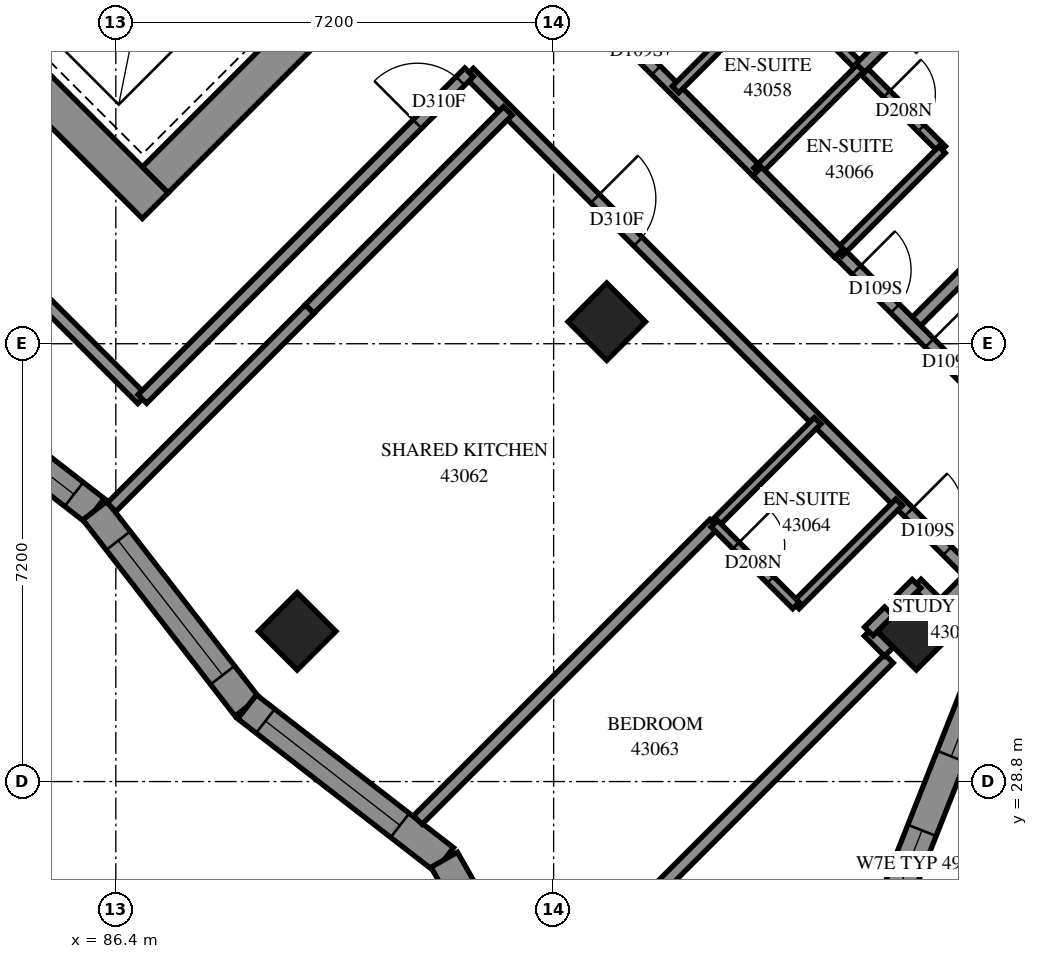
"""IFC4 building model, lengths in metres.
Left out: names, types, materials, properties, quantities, classifications, styles, units other than length and angle.
Written with IfcOpenShell. Run it as: python <this file> out.ifc"""

import sys

from ifc_helpers import new_model, si_unit, direction, frame, frame_2d, origin, origin_2d, place, context, subcontext, project, spatial, polyline, rectangle, outline, extrude, element, fill, save


model = new_model("IFC4")
c1 = context("Model", 3, precision=1e-05, world=origin(), true_north=direction((0.0, 1.0)))
c2 = subcontext(c1, "Body", "Model", "MODEL_VIEW")
j1 = project(units=[si_unit("LENGTHUNIT", "METRE"), si_unit("PLANEANGLEUNIT", "RADIAN")], contexts=[c1])
p1 = place(None, origin())
s1 = spatial("IfcSite", under=j1, at=p1, CompositionType="ELEMENT")
p2 = place(p1, origin())
s2 = spatial("IfcBuilding", under=s1, at=p2, CompositionType="ELEMENT")
p3 = place(p2, frame((0.0, 0.0, 159.2)))
s3 = spatial("IfcBuildingStorey", under=s2, at=p3, CompositionType="ELEMENT", Elevation=159.2)
for number, where, z_axis, x_axis in (
    (1, (94.474, 36.362, 0.0), (0.0, 0.0, 1.0), (0.707, -0.707, 0.0)),
    (2, (89.382, 31.271, 0.0), (0.0, 0.0, 1.0), (0.707, -0.707, 0.0)),
    (3, (99.565, 31.271, 0.0), (0.0, 0.0, 1.0), (0.707, -0.707, 0.0)),
):
    element("IfcColumn", number, at=place(p3, frame(where, z_axis=z_axis, x_axis=x_axis)), inside=s3, PredefinedType="COLUMN", context=c2, shape_type="SweptSolid", body=[
        extrude(rectangle(XDim=0.9, YDim=0.9, at=origin_2d()), origin(), (0.0, 0.0, 1.0), 3.1),
    ])
p4 = place(p3, frame((76.018, 49.302, -0.3), z_axis=(0.0, 0.0, 1.0), x_axis=(0.7071067812, -0.7071067812, 0.0)))
e4 = element("IfcWall", 4, at=p4, inside=s3, PredefinedType="SHEAR", context=c2, shape_type="SweptSolid", body=[
    extrude(rectangle(XDim=15.6, YDim=0.6, at=frame_2d((7.8, 0.0))), origin(), (0.0, 0.0, 1.0), 2.7),
])
p5 = place(p3, frame((87.049, 38.695, -0.3), z_axis=(0.0, 0.0, 1.0), x_axis=(0.7071067812, 0.7071067812, 0.0)))
e5 = element("IfcWall", 5, at=p5, inside=s3, PredefinedType="SHEAR", context=c2, shape_type="SweptSolid", body=[
    extrude(rectangle(XDim=14.4, YDim=0.6, at=frame_2d((7.2, 0.0))), origin(), (0.0, 0.0, 1.0), 2.7),
])
p6 = place(p5, frame((4.55, 0.0, 0.3)))
e6 = element("IfcOpeningElement", 6, at=p6, cuts=e5, PredefinedType="OPENING", context=c2, shape_type="SweptSolid", body=[
    extrude(rectangle(XDim=1.1, YDim=2.1, at=frame_2d((0.55, 1.05))), frame((0.0, 0.31, 0.0), z_axis=(0.0, -1.0, 0.0), x_axis=(1.0, 0.0, 0.0)), (0.0, 0.0, 1.0), 0.62),
])
p7 = place(p5, frame((11.35, 0.0, 0.3)))
e7 = element("IfcOpeningElement", 7, at=p7, cuts=e5, PredefinedType="OPENING", context=c2, shape_type="SweptSolid", body=[
    extrude(rectangle(XDim=1.1, YDim=2.1, at=frame_2d((0.55, 1.05))), frame((0.0, 0.31, 0.0), z_axis=(0.0, -1.0, 0.0), x_axis=(1.0, 0.0, 0.0)), (0.0, 0.0, 1.0), 0.62),
])
p8 = place(p3, frame((98.784, 25.787, 0.0), z_axis=(0.0, 0.0, 1.0), x_axis=(0.3677363656, 0.9299300863, 0.0)))
e8 = element("IfcWall", 8, at=p8, inside=s3, PredefinedType="SOLIDWALL", context=c2, shape_type="SweptSolid", body=[
    extrude(outline(polyline([(-0.113, -0.25), (5.421, -0.25), (5.638, 0.25), (0.113, 0.25), (-0.113, -0.25)])), origin(), (0.0, 0.0, 1.0), 3.1),
])
p9 = place(p8, frame((1.177, 0.0, 0.45)))
e9 = element("IfcOpeningElement", 9, at=p9, cuts=e8, PredefinedType="OPENING", context=c2, shape_type="SweptSolid", body=[
    extrude(rectangle(XDim=1.2, YDim=2.5, at=frame_2d((0.6, 1.25))), frame((0.0, 0.26, 0.0), z_axis=(0.0, -1.0, 0.0), x_axis=(1.0, 0.0, 0.0)), (0.0, 0.0, 1.0), 0.52),
])
p10 = place(p8, frame((3.685, 0.0, 0.45)))
e10 = element("IfcOpeningElement", 10, at=p10, cuts=e8, PredefinedType="OPENING", context=c2, shape_type="SweptSolid", body=[
    extrude(rectangle(XDim=1.2, YDim=2.5, at=frame_2d((0.6, 1.25))), frame((0.0, 0.26, 0.0), z_axis=(0.0, -1.0, 0.0), x_axis=(1.0, 0.0, 0.0)), (0.0, 0.0, 1.0), 0.52),
])
p11 = place(p3, frame((82.828, 35.76, 0.0), z_axis=(0.0, 0.0, 1.0), x_axis=(0.7901609986, -0.6128993362, 0.0)))
e11 = element("IfcWall", 11, at=p11, inside=s3, PredefinedType="SOLIDWALL", context=c2, shape_type="SweptSolid", body=[
    extrude(outline(polyline([(-0.032, -0.25), (4.053, -0.25), (4.116, 0.25), (0.032, 0.25), (-0.032, -0.25)])), origin(), (0.0, 0.0, 1.0), 3.1),
])
p12 = place(p11, frame((0.849, 0.0, 0.45)))
e12 = element("IfcOpeningElement", 12, at=p12, cuts=e11, PredefinedType="OPENING", context=c2, shape_type="SweptSolid", body=[
    extrude(rectangle(XDim=2.8, YDim=2.5, at=frame_2d((1.4, 1.25))), frame((0.0, 0.26, 0.0), z_axis=(0.0, -1.0, 0.0), x_axis=(1.0, 0.0, 0.0)), (0.0, 0.0, 1.0), 0.52),
])
p13 = place(p3, frame((86.056, 33.257, 0.0), z_axis=(0.0, 0.0, 1.0), x_axis=(0.6128993362, -0.7901609986, 0.0)))
e13 = element("IfcWall", 13, at=p13, inside=s3, PredefinedType="SOLIDWALL", context=c2, shape_type="SweptSolid", body=[
    extrude(outline(polyline([(0.032, -0.25), (4.116, -0.25), (4.053, 0.25), (-0.032, 0.25), (0.032, -0.25)])), origin(), (0.0, 0.0, 1.0), 3.1),
])
p14 = place(p13, frame((0.626, 0.0, 0.45)))
e14 = element("IfcOpeningElement", 14, at=p14, cuts=e13, PredefinedType="OPENING", context=c2, shape_type="SweptSolid", body=[
    extrude(rectangle(XDim=2.8, YDim=2.5, at=frame_2d((1.4, 1.25))), frame((0.0, 0.26, 0.0), z_axis=(0.0, -1.0, 0.0), x_axis=(1.0, 0.0, 0.0)), (0.0, 0.0, 1.0), 0.52),
])
p15 = place(p3, frame((88.559, 30.029, 0.0), z_axis=(0.0, 0.0, 1.0), x_axis=(0.7901665614, -0.6128921644, 0.0)))
e15 = element("IfcWall", 15, at=p15, inside=s3, PredefinedType="SOLIDWALL", context=c2, shape_type="SweptSolid", body=[
    extrude(outline(polyline([(-0.032, -0.25), (4.053, -0.25), (4.152, 0.25), (0.032, 0.25), (-0.032, -0.25)])), origin(), (0.0, 0.0, 1.0), 3.1),
])
p16 = place(p15, frame((0.381, 0.0, 0.45)))
e16 = element("IfcOpeningElement", 16, at=p16, cuts=e15, PredefinedType="OPENING", context=c2, shape_type="SweptSolid", body=[
    extrude(rectangle(XDim=2.8, YDim=2.5, at=frame_2d((1.4, 1.25))), frame((0.0, 0.26, 0.0), z_axis=(0.0, -1.0, 0.0), x_axis=(1.0, 0.0, 0.0)), (0.0, 0.0, 1.0), 0.52),
])
p17 = place(p3, frame((91.801, 27.515, 0.0), z_axis=(0.0, 0.0, 1.0), x_axis=(0.4947688164, -0.8690246362, 0.0)))
e17 = element("IfcWall", 17, at=p17, inside=s3, PredefinedType="SOLIDWALL", context=c2, shape_type="SweptSolid", body=[
    extrude(outline(polyline([(0.05, -0.25), (4.252, -0.25), (3.832, 0.25), (-0.05, 0.25), (0.05, -0.25)])), origin(), (0.0, 0.0, 1.0), 3.1),
])
p18 = place(p17, frame((0.769, 0.0, 0.45)))
e18 = element("IfcOpeningElement", 18, at=p18, cuts=e17, PredefinedType="OPENING", context=c2, shape_type="SweptSolid", body=[
    extrude(rectangle(XDim=1.2, YDim=2.5, at=frame_2d((0.6, 1.25))), frame((0.0, 0.26, 0.0), z_axis=(0.0, -1.0, 0.0), x_axis=(1.0, 0.0, 0.0)), (0.0, 0.0, 1.0), 0.52),
])
p19 = place(p3, frame((92.209, 40.459, 0.0), z_axis=(0.0, 0.0, 1.0), x_axis=(0.7071067812, -0.7071067812, 0.0)))
e19 = element("IfcWall", 19, at=p19, inside=s3, PredefinedType="PARTITIONING", context=c2, shape_type="SweptSolid", body=[
    extrude(rectangle(XDim=11.698, YDim=0.2, at=frame_2d((5.849, 0.0))), origin(), (0.0, 0.0, 1.0), 3.1),
])
p20 = place(p19, frame((2.931, 0.0, 0.0)))
e20 = element("IfcOpeningElement", 20, at=p20, cuts=e19, PredefinedType="OPENING", context=c2, shape_type="SweptSolid", body=[
    extrude(rectangle(XDim=1.0, YDim=2.1, at=frame_2d((0.5, 1.05))), frame((0.0, 0.11, 0.0), z_axis=(0.0, -1.0, 0.0), x_axis=(1.0, 0.0, 0.0)), (0.0, 0.0, 1.0), 0.22),
])
p21 = place(p19, frame((10.223, 0.0, 0.0)))
e21 = element("IfcOpeningElement", 21, at=p21, cuts=e19, PredefinedType="OPENING", context=c2, shape_type="SweptSolid", body=[
    extrude(rectangle(XDim=0.9, YDim=2.1, at=frame_2d((0.45, 1.05))), frame((0.0, 0.11, 0.0), z_axis=(0.0, -1.0, 0.0), x_axis=(1.0, 0.0, 0.0)), (0.0, 0.0, 1.0), 0.22),
])
p22 = place(p3, frame((80.423, 41.497, 0.0), z_axis=(0.0, 0.0, 1.0), x_axis=(0.7071067812, -0.7071067812, 0.0)))
e22 = element("IfcWall", 22, at=p22, inside=s3, PredefinedType="PARTITIONING", context=c2, shape_type="SweptSolid", body=[
    extrude(rectangle(XDim=9.065, YDim=0.2, at=frame_2d((4.532, 0.0))), origin(), (0.0, 0.0, 1.0), 3.1),
])
p23 = place(p3, frame((86.837, 35.091, 0.0), z_axis=(0.0, 0.0, 1.0), x_axis=(0.7071067812, 0.7071067812, 0.0)))
e23 = element("IfcWall", 23, at=p23, inside=s3, PredefinedType="PARTITIONING", context=c2, shape_type="SweptSolid", body=[
    extrude(rectangle(XDim=7.597, YDim=0.2, at=frame_2d((3.799, 0.0))), origin(), (0.0, 0.0, 1.0), 3.1),
])
p24 = place(p23, frame((6.395, 0.0, 0.0)))
e24 = element("IfcOpeningElement", 24, at=p24, cuts=e23, PredefinedType="OPENING", context=c2, shape_type="SweptSolid", body=[
    extrude(rectangle(XDim=1.0, YDim=2.1, at=frame_2d((0.5, 1.05))), frame((0.0, 0.11, 0.0), z_axis=(0.0, -1.0, 0.0), x_axis=(1.0, 0.0, 0.0)), (0.0, 0.0, 1.0), 0.22),
])
p25 = place(p3, frame((91.366, 28.168, 0.0), z_axis=(0.0, 0.0, 1.0), x_axis=(0.7072591319, 0.7069543977, 0.0)))
e25 = element("IfcWall", 25, at=p25, inside=s3, PredefinedType="PARTITIONING", context=c2, shape_type="SweptSolid", body=[
    extrude(rectangle(XDim=6.891, YDim=0.2, at=frame_2d((3.446, 0.0))), origin(), (0.0, 0.0, 1.0), 3.1),
])
p26 = place(p3, frame((99.494, 36.292, 0.0), z_axis=(0.0, 0.0, 1.0), x_axis=(0.7071067812, 0.7071067812, 0.0)))
e26 = element("IfcWall", 26, at=p26, inside=s3, PredefinedType="PARTITIONING", context=c2, shape_type="SweptSolid", body=[
    extrude(rectangle(XDim=6.799, YDim=0.2, at=frame_2d((3.4, 0.0))), origin(), (0.0, 0.0, 1.0), 3.1),
])
p27 = place(p3, frame((94.923, 26.631, 0.0), z_axis=(0.0, 0.0, 1.0), x_axis=(0.7071067812, 0.7071067812, 0.0)))
e27 = element("IfcWall", 27, at=p27, inside=s3, PredefinedType="PARTITIONING", context=c2, shape_type="SweptSolid", body=[
    extrude(rectangle(XDim=5.926, YDim=0.2, at=frame_2d((2.963, 0.0))), origin(), (0.0, 0.0, 1.0), 2.6),
])
p28 = place(p3, frame((98.295, 37.497, 0.0), z_axis=(0.0, 0.0, 1.0), x_axis=(0.7071067812, -0.7071067812, 0.0)))
e28 = element("IfcWall", 28, at=p28, inside=s3, PredefinedType="PARTITIONING", context=c2, shape_type="SweptSolid", body=[
    extrude(rectangle(XDim=5.301, YDim=0.2, at=frame_2d((2.65, 0.0))), origin(), (0.0, 0.0, 1.0), 3.1),
])
p29 = place(p28, frame((0.401, 0.0, 0.0)))
e29 = element("IfcOpeningElement", 29, at=p29, cuts=e28, PredefinedType="OPENING", context=c2, shape_type="SweptSolid", body=[
    extrude(rectangle(XDim=0.9, YDim=2.1, at=frame_2d((0.45, 1.05))), frame((0.0, 0.11, 0.0), z_axis=(0.0, -1.0, 0.0), x_axis=(1.0, 0.0, 0.0)), (0.0, 0.0, 1.0), 0.22),
])
p30 = place(p28, frame((2.1, 0.0, 0.0)))
e30 = element("IfcOpeningElement", 30, at=p30, cuts=e28, PredefinedType="OPENING", context=c2, shape_type="SweptSolid", body=[
    extrude(rectangle(XDim=0.9, YDim=2.1, at=frame_2d((0.45, 1.05))), frame((0.0, 0.11, 0.0), z_axis=(0.0, -1.0, 0.0), x_axis=(1.0, 0.0, 0.0)), (0.0, 0.0, 1.0), 0.22),
])
p31 = place(p3, frame((89.586, 36.57, 0.0), z_axis=(0.0, 0.0, 1.0), x_axis=(0.7073237184, 0.7068897774, 0.0)))
e31 = element("IfcWall", 31, at=p31, inside=s3, PredefinedType="PARTITIONING", context=c2, shape_type="SweptSolid", body=[
    extrude(rectangle(XDim=4.609, YDim=0.2, at=frame_2d((2.304, 0.0))), origin(), (0.0, 0.0, 1.0), 3.1),
])
p32 = place(p3, frame((86.33, 33.311, 0.0), z_axis=(0.0, 0.0, 1.0), x_axis=(0.7070959278, 0.7071176345, 0.0)))
e32 = element("IfcWall", 32, at=p32, inside=s3, PredefinedType="PARTITIONING", context=c2, shape_type="SweptSolid", body=[
    extrude(rectangle(XDim=4.607, YDim=0.2, at=frame_2d((2.304, 0.0))), origin(), (0.0, 0.0, 1.0), 3.1),
])
p33 = place(p3, frame((97.305, 41.881, 0.0), z_axis=(0.0, 0.0, 1.0), x_axis=(0.7067382634, -0.707475107, 0.0)))
e33 = element("IfcWall", 33, at=p33, inside=s3, PredefinedType="PARTITIONING", context=c2, shape_type="SweptSolid", body=[
    extrude(rectangle(XDim=3.8, YDim=0.15, at=frame_2d((1.9, 0.0))), origin(), (0.0, 0.0, 1.0), 3.1),
])
p34 = place(p33, frame((0.445, 0.0, 0.0)))
e34 = element("IfcOpeningElement", 34, at=p34, cuts=e33, PredefinedType="OPENING", context=c2, shape_type="SweptSolid", body=[
    extrude(rectangle(XDim=0.8, YDim=2.1, at=frame_2d((0.4, 1.05))), frame((0.0, 0.085, 0.0), z_axis=(0.0, -1.0, 0.0), x_axis=(1.0, 0.0, 0.0)), (0.0, 0.0, 1.0), 0.17),
])
p35 = place(p33, frame((2.507, 0.0, 0.0)))
e35 = element("IfcOpeningElement", 35, at=p35, cuts=e33, PredefinedType="OPENING", context=c2, shape_type="SweptSolid", body=[
    extrude(rectangle(XDim=0.8, YDim=2.1, at=frame_2d((0.4, 1.05))), frame((0.0, 0.085, 0.0), z_axis=(0.0, -1.0, 0.0), x_axis=(1.0, 0.0, 0.0)), (0.0, 0.0, 1.0), 0.17),
])
p36 = place(p3, frame((94.399, 41.379, 0.0), z_axis=(0.0, 0.0, 1.0), x_axis=(0.7071067812, -0.7071067812, 0.0)))
e36 = element("IfcWall", 36, at=p36, inside=s3, PredefinedType="PARTITIONING", context=c2, shape_type="SweptSolid", body=[
    extrude(rectangle(XDim=3.601, YDim=0.2, at=frame_2d((1.8, 0.0))), origin(), (0.0, 0.0, 1.0), 3.1),
])
p37 = place(p36, frame((0.35, 0.0, 0.0)))
e37 = element("IfcOpeningElement", 37, at=p37, cuts=e36, PredefinedType="OPENING", context=c2, shape_type="SweptSolid", body=[
    extrude(rectangle(XDim=0.9, YDim=2.1, at=frame_2d((0.45, 1.05))), frame((0.0, 0.11, 0.0), z_axis=(0.0, -1.0, 0.0), x_axis=(1.0, 0.0, 0.0)), (0.0, 0.0, 1.0), 0.22),
])
for number, where, z_axis, x_axis in (
    (38, (95.603, 40.181, 0.0), (0.0, 0.0, 1.0), (0.707, 0.707, 0.0)),
    (39, (96.947, 38.837, 0.0), (0.0, 0.0, 1.0), (0.707, 0.707, 0.0)),
    (40, (97.583, 31.695, 0.0), (0.0, 0.0, 1.0), (0.707, 0.707, 0.0)),
):
    element("IfcWall", number, at=place(p3, frame(where, z_axis=z_axis, x_axis=x_axis)), inside=s3, PredefinedType="PARTITIONING", context=c2, shape_type="SweptSolid", body=[
        extrude(rectangle(XDim=2.401, YDim=0.15, at=frame_2d((1.201, 0.0))), origin(), (0.0, 0.0, 1.0), 3.1),
    ])
p38 = place(p3, frame((96.245, 33.035, 0.0), z_axis=(0.0, 0.0, 1.0), x_axis=(0.706689978, 0.7075233388, 0.0)))
e41 = element("IfcWall", 41, at=p38, inside=s3, PredefinedType="PARTITIONING", context=c2, shape_type="SweptSolid", body=[
    extrude(rectangle(XDim=2.4, YDim=0.15, at=frame_2d((1.2, 0.0))), origin(), (0.0, 0.0, 1.0), 3.1),
])
p39 = place(p3, frame((98.291, 37.495, 0.0), z_axis=(0.0, 0.0, 1.0), x_axis=(0.7071067812, 0.7071067812, 0.0)))
e42 = element("IfcWall", 42, at=p39, inside=s3, PredefinedType="PARTITIONING", context=c2, shape_type="SweptSolid", body=[
    extrude(rectangle(XDim=2.398, YDim=0.15, at=frame_2d((1.199, 0.0))), origin(), (0.0, 0.0, 1.0), 3.1),
])
p40 = place(p3, frame((96.946, 38.834, 0.0), z_axis=(0.0, 0.0, 1.0), x_axis=(0.7076330979, -0.7065800724, 0.0)))
e43 = element("IfcWall", 43, at=p40, inside=s3, PredefinedType="PARTITIONING", context=c2, shape_type="SweptSolid", body=[
    extrude(rectangle(XDim=1.899, YDim=0.2, at=frame_2d((0.95, 0.0))), origin(), (0.0, 0.0, 1.0), 3.1),
])
p41 = place(p3, frame((96.243, 33.039, 0.0), z_axis=(0.0, 0.0, 1.0), x_axis=(0.7065800724, -0.7076330979, 0.0)))
e44 = element("IfcWall", 44, at=p41, inside=s3, PredefinedType="PARTITIONING", context=c2, shape_type="SweptSolid", body=[
    extrude(rectangle(XDim=1.899, YDim=0.15, at=frame_2d((0.95, 0.0))), origin(), (0.0, 0.0, 1.0), 3.1),
])
p42 = place(p41, frame((0.504, 0.0, 0.0)))
e45 = element("IfcOpeningElement", 45, at=p42, cuts=e44, PredefinedType="OPENING", context=c2, shape_type="SweptSolid", body=[
    extrude(rectangle(XDim=0.8, YDim=2.1, at=frame_2d((0.4, 1.05))), frame((0.0, 0.085, 0.0), z_axis=(0.0, -1.0, 0.0), x_axis=(1.0, 0.0, 0.0)), (0.0, 0.0, 1.0), 0.17),
])
p43 = place(p3, frame((98.645, 40.535, 0.0), z_axis=(0.0, 0.0, 1.0), x_axis=(0.7071067812, 0.7071067812, 0.0)))
e46 = element("IfcWall", 46, at=p43, inside=s3, PredefinedType="PARTITIONING", context=c2, shape_type="SweptSolid", body=[
    extrude(rectangle(XDim=0.665, YDim=0.2, at=frame_2d((0.332, 0.0))), origin(), (0.0, 0.0, 1.0), 3.1),
])
p44 = place(p3, frame((100.013, 31.721, 0.0), z_axis=(0.0, 0.0, 1.0), x_axis=(0.7071067812, 0.7071067812, 0.0)))
e47 = element("IfcWall", 47, at=p44, inside=s3, PredefinedType="PARTITIONING", context=c2, shape_type="SweptSolid", body=[
    extrude(rectangle(XDim=0.665, YDim=0.2, at=frame_2d((0.332, 0.0))), origin(), (0.0, 0.0, 1.0), 2.6),
])
p45 = place(p3, frame((99.571, 32.055, 0.0), z_axis=(0.0, 0.0, 1.0), x_axis=(0.7092270271, -0.7049801586, 0.0)))
e48 = element("IfcWall", 48, at=p45, inside=s3, PredefinedType="PARTITIONING", context=c2, shape_type="SweptSolid", body=[
    extrude(rectangle(XDim=0.471, YDim=0.2, at=frame_2d((0.235, 0.0))), origin(), (0.0, 0.0, 1.0), 3.1),
])
p46 = place(p3, frame((99.235, 31.721, 0.0), z_axis=(0.0, 0.0, 1.0), x_axis=(0.7071067812, 0.7071067812, 0.0)))
e49 = element("IfcWall", 49, at=p46, inside=s3, PredefinedType="PARTITIONING", context=c2, shape_type="SweptSolid", body=[
    extrude(rectangle(XDim=0.469, YDim=0.2, at=frame_2d((0.235, 0.0))), origin(), (0.0, 0.0, 1.0), 3.1),
])
p47 = place(p3, frame((98.781, 31.265, 0.0), z_axis=(0.0, 0.0, 1.0), x_axis=(0.7049672897, -0.7092398187, 0.0)))
e50 = element("IfcWall", 50, at=p47, inside=s3, PredefinedType="PARTITIONING", context=c2, shape_type="SweptSolid", body=[
    extrude(rectangle(XDim=0.468, YDim=0.2, at=frame_2d((0.234, 0.0))), origin(), (0.0, 0.0, 1.0), 3.1),
])
p48 = place(p3, frame((98.783, 31.269, 0.0), z_axis=(0.0, 0.0, 1.0), x_axis=(0.7071067812, 0.7071067812, 0.0)))
e51 = element("IfcWall", 51, at=p48, inside=s3, PredefinedType="PARTITIONING", context=c2, shape_type="SweptSolid", body=[
    extrude(rectangle(XDim=0.467, YDim=0.2, at=frame_2d((0.233, 0.0))), origin(), (0.0, 0.0, 1.0), 3.1),
])
p49 = place(p9, origin())
e52 = element("IfcWindow", 52, at=p49, inside=s3, PartitioningType="SINGLE_PANEL", PredefinedType="WINDOW", context=c2, shape_type="SweptSolid", body=[
    extrude(rectangle(XDim=1.2, YDim=2.5, at=frame_2d((0.6, 1.25))), frame((0.0, 0.18, 0.0), z_axis=(0.0, -1.0, 0.0), x_axis=(1.0, 0.0, 0.0)), (0.0, 0.0, 1.0), 0.06),
])
fill(e9, e52)
p50 = place(p10, origin())
e53 = element("IfcWindow", 53, at=p50, inside=s3, PartitioningType="SINGLE_PANEL", PredefinedType="WINDOW", context=c2, shape_type="SweptSolid", body=[
    extrude(rectangle(XDim=1.2, YDim=2.5, at=frame_2d((0.6, 1.25))), frame((0.0, 0.18, 0.0), z_axis=(0.0, -1.0, 0.0), x_axis=(1.0, 0.0, 0.0)), (0.0, 0.0, 1.0), 0.06),
])
fill(e10, e53)
p51 = place(p12, origin())
e54 = element("IfcWindow", 54, at=p51, inside=s3, PartitioningType="SINGLE_PANEL", PredefinedType="WINDOW", context=c2, shape_type="SweptSolid", body=[
    extrude(rectangle(XDim=2.8, YDim=2.5, at=frame_2d((1.4, 1.25))), frame((0.0, 0.18, 0.0), z_axis=(0.0, -1.0, 0.0), x_axis=(1.0, 0.0, 0.0)), (0.0, 0.0, 1.0), 0.06),
])
fill(e12, e54)
p52 = place(p14, origin())
e55 = element("IfcWindow", 55, at=p52, inside=s3, PartitioningType="SINGLE_PANEL", PredefinedType="WINDOW", context=c2, shape_type="SweptSolid", body=[
    extrude(rectangle(XDim=2.8, YDim=2.5, at=frame_2d((1.4, 1.25))), frame((0.0, 0.18, 0.0), z_axis=(0.0, -1.0, 0.0), x_axis=(1.0, 0.0, 0.0)), (0.0, 0.0, 1.0), 0.06),
])
fill(e14, e55)
p53 = place(p16, origin())
e56 = element("IfcWindow", 56, at=p53, inside=s3, PartitioningType="SINGLE_PANEL", PredefinedType="WINDOW", context=c2, shape_type="SweptSolid", body=[
    extrude(rectangle(XDim=2.8, YDim=2.5, at=frame_2d((1.4, 1.25))), frame((0.0, 0.18, 0.0), z_axis=(0.0, -1.0, 0.0), x_axis=(1.0, 0.0, 0.0)), (0.0, 0.0, 1.0), 0.06),
])
fill(e16, e56)
p54 = place(p37, origin())
e57 = element("IfcDoor", 57, at=p54, inside=s3, OperationType="SINGLE_SWING_RIGHT", PredefinedType="DOOR", context=c2, shape_type="SweptSolid", body=[
    extrude(rectangle(XDim=0.9, YDim=2.1, at=frame_2d((0.45, 1.05))), frame((0.0, 0.025, 0.0), z_axis=(0.0, -1.0, 0.0), x_axis=(1.0, 0.0, 0.0)), (0.0, 0.0, 1.0), 0.05),
])
fill(e37, e57)
p55 = place(p24, origin())
e58 = element("IfcDoor", 58, at=p55, inside=s3, OperationType="SINGLE_SWING_LEFT", PredefinedType="DOOR", context=c2, shape_type="SweptSolid", body=[
    extrude(rectangle(XDim=1.0, YDim=2.1, at=frame_2d((0.5, 1.05))), frame((0.0, 0.025, 0.0), z_axis=(0.0, -1.0, 0.0), x_axis=(1.0, 0.0, 0.0)), (0.0, 0.0, 1.0), 0.05),
])
fill(e24, e58)
p56 = place(p20, origin())
e59 = element("IfcDoor", 59, at=p56, inside=s3, OperationType="SINGLE_SWING_LEFT", PredefinedType="DOOR", context=c2, shape_type="SweptSolid", body=[
    extrude(rectangle(XDim=1.0, YDim=2.1, at=frame_2d((0.5, 1.05))), frame((0.0, 0.025, 0.0), z_axis=(0.0, -1.0, 0.0), x_axis=(1.0, 0.0, 0.0)), (0.0, 0.0, 1.0), 0.05),
])
fill(e20, e59)
p57 = place(p21, origin())
e60 = element("IfcDoor", 60, at=p57, inside=s3, OperationType="SINGLE_SWING_LEFT", PredefinedType="DOOR", context=c2, shape_type="SweptSolid", body=[
    extrude(rectangle(XDim=0.9, YDim=2.1, at=frame_2d((0.45, 1.05))), frame((0.0, 0.025, 0.0), z_axis=(0.0, -1.0, 0.0), x_axis=(1.0, 0.0, 0.0)), (0.0, 0.0, 1.0), 0.05),
])
fill(e21, e60)
p58 = place(p42, origin())
e61 = element("IfcDoor", 61, at=p58, inside=s3, OperationType="SINGLE_SWING_RIGHT", PredefinedType="DOOR", context=c2, shape_type="SweptSolid", body=[
    extrude(rectangle(XDim=0.8, YDim=2.1, at=frame_2d((0.4, 1.05))), frame((0.0, 0.025, 0.0), z_axis=(0.0, -1.0, 0.0), x_axis=(1.0, 0.0, 0.0)), (0.0, 0.0, 1.0), 0.05),
])
fill(e45, e61)
p59 = place(p29, origin())
e62 = element("IfcDoor", 62, at=p59, inside=s3, OperationType="SINGLE_SWING_LEFT", PredefinedType="DOOR", context=c2, shape_type="SweptSolid", body=[
    extrude(rectangle(XDim=0.9, YDim=2.1, at=frame_2d((0.45, 1.05))), frame((0.0, 0.025, 0.0), z_axis=(0.0, -1.0, 0.0), x_axis=(1.0, 0.0, 0.0)), (0.0, 0.0, 1.0), 0.05),
])
fill(e29, e62)
p60 = place(p35, origin())
e63 = element("IfcDoor", 63, at=p60, inside=s3, OperationType="SINGLE_SWING_RIGHT", PredefinedType="DOOR", context=c2, shape_type="SweptSolid", body=[
    extrude(rectangle(XDim=0.8, YDim=2.1, at=frame_2d((0.4, 1.05))), frame((0.0, 0.025, 0.0), z_axis=(0.0, -1.0, 0.0), x_axis=(1.0, 0.0, 0.0)), (0.0, 0.0, 1.0), 0.05),
])
fill(e35, e63)
p61 = place(p30, origin())
e64 = element("IfcDoor", 64, at=p61, inside=s3, OperationType="SINGLE_SWING_RIGHT", PredefinedType="DOOR", context=c2, shape_type="SweptSolid", body=[
    extrude(rectangle(XDim=0.9, YDim=2.1, at=frame_2d((0.45, 1.05))), frame((0.0, 0.025, 0.0), z_axis=(0.0, -1.0, 0.0), x_axis=(1.0, 0.0, 0.0)), (0.0, 0.0, 1.0), 0.05),
])
fill(e30, e64)
save(model, sys.argv[1])
